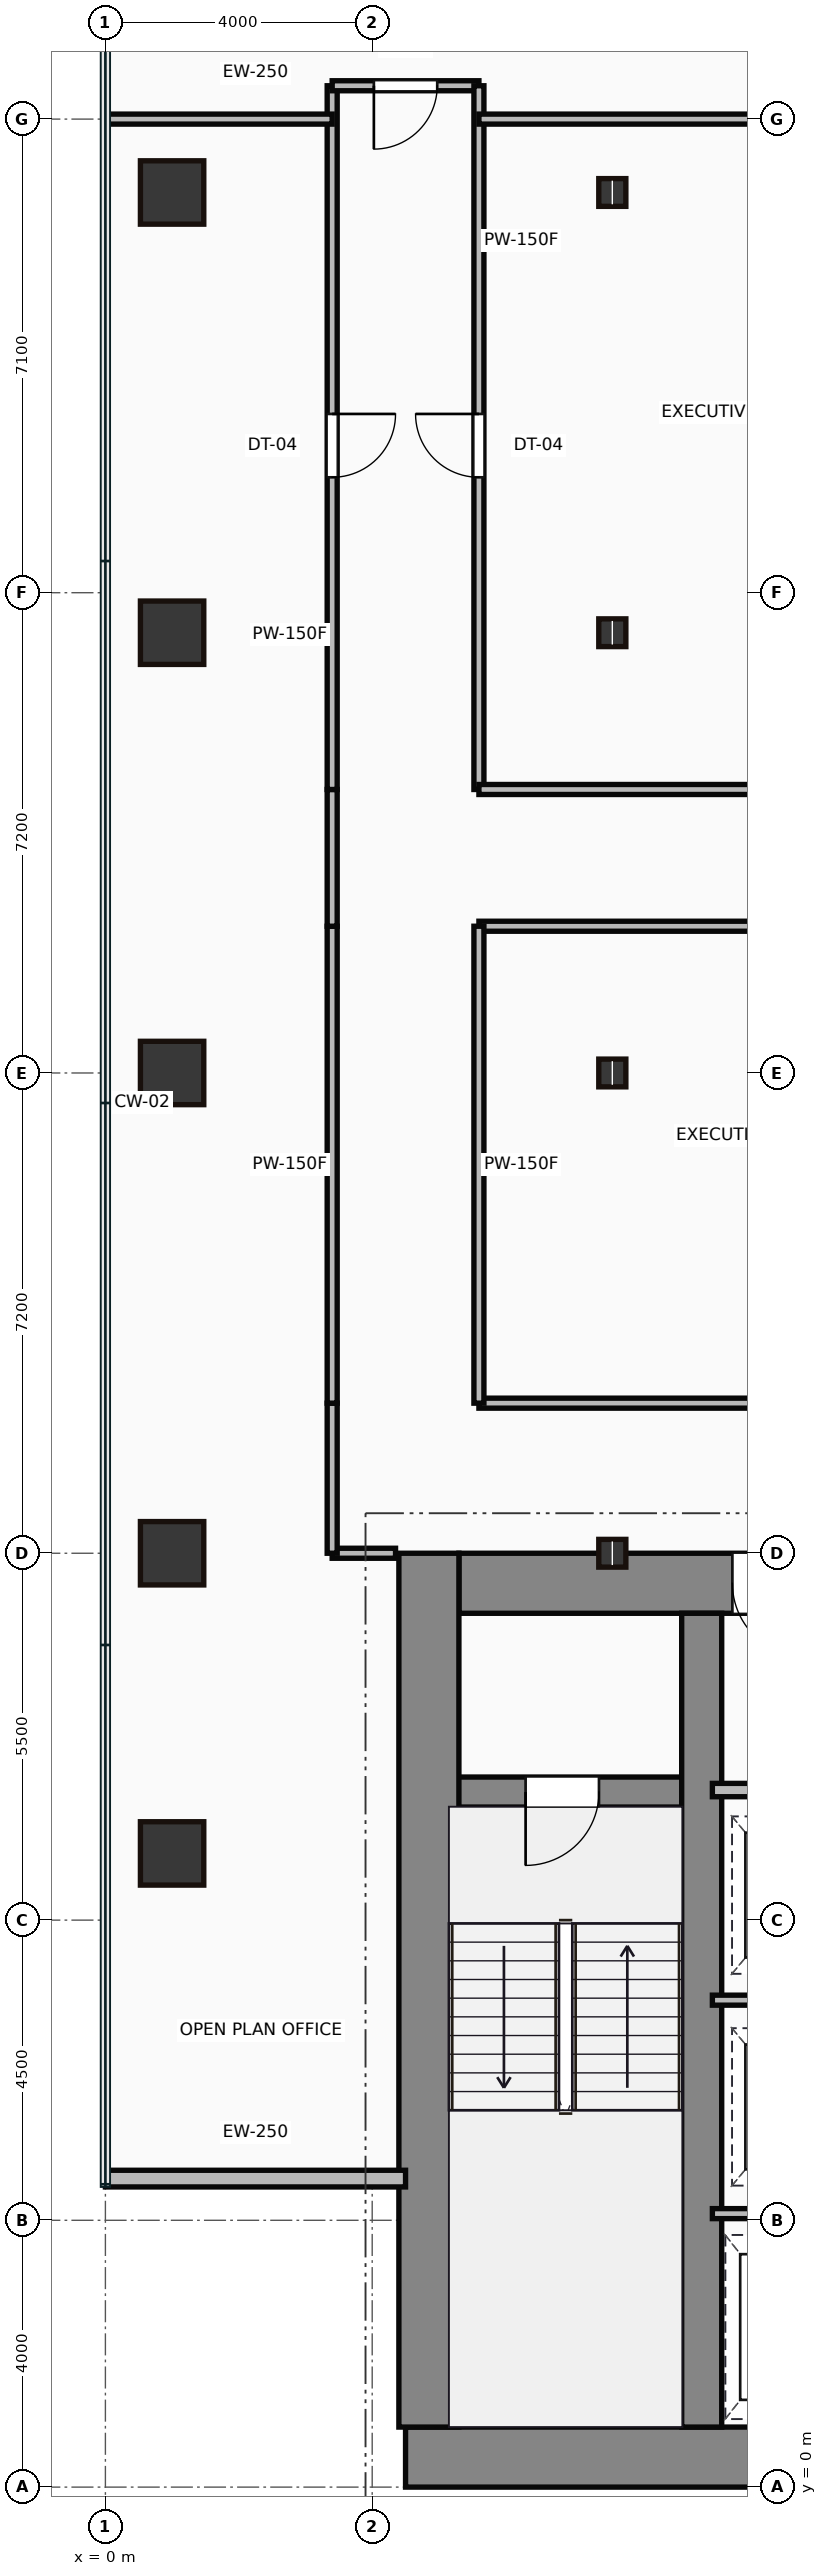
"""IFC4 building model, lengths in metres.
Left out: names, types, materials, properties, quantities, classifications, styles, units other than length and angle.
Written with IfcOpenShell. Run it as: python <this file> out.ifc"""

import sys

from ifc_helpers import new_model, si_unit, direction, frame, frame_2d, origin, origin_2d, place, context, subcontext, project, spatial, rectangle, hollow_rectangle, i_section, extrude, source, transform, mapped, element, fill, save


model = new_model("IFC4")
c1 = context("Model", 3, precision=1e-05, world=origin(), true_north=direction((0.0, 1.0)))
c2 = subcontext(c1, "Body", "Model", "MODEL_VIEW")
j1 = project(units=[si_unit("LENGTHUNIT", "METRE"), si_unit("PLANEANGLEUNIT", "RADIAN")], contexts=[c1])
p1 = place(None, origin())
s1 = spatial("IfcSite", under=j1, at=p1, CompositionType="ELEMENT")
p2 = place(p1, origin())
s2 = spatial("IfcBuilding", under=s1, at=p2, CompositionType="ELEMENT")
p3 = place(p2, frame((0.0, 0.0, 69.0)))
s3 = spatial("IfcBuildingStorey", under=s2, at=p3, CompositionType="ELEMENT", Elevation=69.0)
m1 = source(origin(), c2, "Body", "SweptSolid", [
    extrude(rectangle(XDim=29.5, YDim=0.9, at=frame_2d((14.75, 0.0))), origin(), (0.0, 0.0, 1.0), 3.65),
])
p4 = place(p3, frame((4.5, 0.45, 0.0), z_axis=(0.0, 0.0, 1.0), x_axis=(1.0, 0.0, 0.0)))
e1 = element("IfcWall", 1, at=p4, inside=s3, PredefinedType="SHEAR", context=c2, shape_type="MappedRepresentation", body=[
    mapped(m1, transform((0.0, 0.0, 0.0))),
])
m2 = source(origin(), c2, "Body", "SweptSolid", [
    extrude(rectangle(XDim=13.1, YDim=0.9, at=frame_2d((6.55, 0.0))), origin(), (0.0, 0.0, 1.0), 3.65),
])
p5 = place(p3, frame((4.85, 0.9, 0.0), z_axis=(0.0, 0.0, 1.0), x_axis=(0.0, 1.0, 0.0)))
e2 = element("IfcWall", 2, at=p5, inside=s3, PredefinedType="SHEAR", context=c2, shape_type="MappedRepresentation", body=[
    mapped(m2, transform((0.0, 0.0, 0.0))),
])
m3 = source(origin(), c2, "Body", "SweptSolid", [
    extrude(rectangle(XDim=9.1, YDim=0.9, at=frame_2d((4.55, 0.0))), origin(), (0.0, 0.0, 1.0), 3.65),
])
p6 = place(p3, frame((5.3, 13.55, 0.0), z_axis=(0.0, 0.0, 1.0), x_axis=(1.0, 0.0, 0.0)))
e3 = element("IfcWall", 3, at=p6, inside=s3, PredefinedType="SHEAR", context=c2, shape_type="MappedRepresentation", body=[
    mapped(m3, transform((0.0, 0.0, 0.0))),
])
p7 = place(p6, frame((4.1, 0.0, 0.0)))
e4 = element("IfcOpeningElement", 4, at=p7, cuts=e3, PredefinedType="OPENING", context=c2, shape_type="SweptSolid", body=[
    extrude(rectangle(XDim=1.1, YDim=2.15, at=frame_2d((0.55, 1.075))), frame((0.0, 0.46, 0.0), z_axis=(0.0, -1.0, 0.0), x_axis=(1.0, 0.0, 0.0)), (0.0, 0.0, 1.0), 0.92),
])
m4 = source(origin(), c2, "Body", "SweptSolid", [
    extrude(rectangle(XDim=12.2, YDim=0.6, at=frame_2d((6.1, 0.0))), origin(), (0.0, 0.0, 1.0), 3.65),
])
p8 = place(p3, frame((8.94, 0.9, 0.0), z_axis=(0.0, 0.0, 1.0), x_axis=(0.0, 1.0, 0.0)))
e5 = element("IfcWall", 5, at=p8, inside=s3, PredefinedType="SHEAR", context=c2, shape_type="MappedRepresentation", body=[
    mapped(m4, transform((0.0, 0.0, 0.0))),
])
m5 = source(origin(), c2, "Body", "SweptSolid", [
    extrude(rectangle(XDim=3.39, YDim=0.45, at=frame_2d((1.695, 0.0))), origin(), (0.0, 0.0, 1.0), 3.65),
])
p9 = place(p3, frame((5.25, 10.42, 0.0), z_axis=(0.0, 0.0, 1.0), x_axis=(1.0, 0.0, 0.0)))
e6 = element("IfcWall", 6, at=p9, inside=s3, PredefinedType="SHEAR", context=c2, shape_type="MappedRepresentation", body=[
    mapped(m5, transform((0.0, 0.0, 0.0))),
])
p10 = place(p9, frame((1.05, 0.0, 0.0)))
e7 = element("IfcOpeningElement", 7, at=p10, cuts=e6, PredefinedType="OPENING", context=c2, shape_type="SweptSolid", body=[
    extrude(rectangle(XDim=1.1, YDim=2.15, at=frame_2d((0.55, 1.075))), frame((0.0, 0.235, 0.0), z_axis=(0.0, -1.0, 0.0), x_axis=(1.0, 0.0, 0.0)), (0.0, 0.0, 1.0), 0.47),
])
m6 = source(origin(), c2, "Body", "SweptSolid", [
    extrude(hollow_rectangle(XDim=0.95, YDim=0.95, WallThickness=0.045, at=origin_2d()), origin(), (0.0, 0.0, 1.0), 3.65),
])
for number, where, z_axis, x_axis in (
    (8, (1.0, 9.5, 0.0), (0.0, 0.0, 1.0), (1.0, 0.0, 0.0)),
    (9, (1.0, 14.0, 0.0), (0.0, 0.0, 1.0), (1.0, 0.0, 0.0)),
    (10, (1.0, 21.2, 0.0), (0.0, 0.0, 1.0), (1.0, 0.0, 0.0)),
    (11, (1.0, 27.8, 0.0), (0.0, 0.0, 1.0), (1.0, 0.0, 0.0)),
    (12, (1.0, 34.4, 0.0), (0.0, 0.0, 1.0), (1.0, 0.0, 0.0)),
):
    element("IfcColumn", number, at=place(p3, frame(where, z_axis=z_axis, x_axis=x_axis)), inside=s3, PredefinedType="COLUMN", context=c2, shape_type="MappedRepresentation", body=[
        mapped(m6, transform((0.0, 0.0, 0.0))),
    ])
m7 = source(origin(), c2, "Body", "SweptSolid", [
    extrude(i_section(OverallWidth=0.406, OverallDepth=0.416, WebThickness=0.03, FlangeThickness=0.048, at=origin_2d()), origin(), (0.0, 0.0, 1.0), 3.65),
])
for number, where, z_axis, x_axis in (
    (13, (7.6, 14.0, 0.0), (0.0, 0.0, 1.0), (1.0, 0.0, 0.0)),
    (14, (7.6, 21.2, 0.0), (0.0, 0.0, 1.0), (1.0, 0.0, 0.0)),
    (15, (7.6, 27.8, 0.0), (0.0, 0.0, 1.0), (1.0, 0.0, 0.0)),
    (16, (7.6, 34.4, 0.0), (0.0, 0.0, 1.0), (1.0, 0.0, 0.0)),
):
    element("IfcColumn", number, at=place(p3, frame(where, z_axis=z_axis, x_axis=x_axis)), inside=s3, PredefinedType="COLUMN", context=c2, shape_type="MappedRepresentation", body=[
        mapped(m7, transform((0.0, 0.0, 0.0))),
    ])
m8 = source(origin(), c2, "Body", "SweptSolid", [
    extrude(rectangle(XDim=4.5, YDim=0.25, at=frame_2d((2.25, 0.0))), origin(), (0.0, 0.0, 1.0), 3.4),
])
p11 = place(p3, frame((0.0, 4.625, 0.0), z_axis=(0.0, 0.0, 1.0), x_axis=(1.0, 0.0, 0.0)))
e17 = element("IfcWall", 17, at=p11, inside=s3, PredefinedType="STANDARD", context=c2, shape_type="MappedRepresentation", body=[
    mapped(m8, transform((0.0, 0.0, 0.0))),
])
m9 = source(origin(), c2, "Body", "SweptSolid", [
    extrude(rectangle(XDim=2.35, YDim=0.2, at=frame_2d((1.175, 0.0))), origin(), (0.0, 0.0, 1.0), 3.4),
])
p12 = place(p3, frame((9.1, 10.45, 0.0), z_axis=(0.0, 0.0, 1.0), x_axis=(1.0, 0.0, 0.0)))
e18 = element("IfcWall", 18, at=p12, inside=s3, PredefinedType="PARTITIONING", context=c2, shape_type="MappedRepresentation", body=[
    mapped(m9, transform((0.0, 0.0, 0.0))),
])
p13 = place(p12, frame((0.55, 0.0, 0.0)))
e19 = element("IfcOpeningElement", 19, at=p13, cuts=e18, PredefinedType="OPENING", context=c2, shape_type="SweptSolid", body=[
    extrude(rectangle(XDim=1.1, YDim=2.15, at=frame_2d((0.55, 1.075))), frame((0.0, 0.11, 0.0), z_axis=(0.0, -1.0, 0.0), x_axis=(1.0, 0.0, 0.0)), (0.0, 0.0, 1.0), 0.22),
])
m10 = source(origin(), c2, "Body", "SweptSolid", [
    extrude(rectangle(XDim=2.4, YDim=0.15, at=frame_2d((1.2, 0.0))), origin(), (0.0, 0.0, 1.0), 3.4),
])
for number, where, z_axis, x_axis in (
    (20, (9.1, 4.1, 0.0), (0.0, 0.0, 1.0), (1.0, 0.0, 0.0)),
    (21, (9.1, 7.3, 0.0), (0.0, 0.0, 1.0), (1.0, 0.0, 0.0)),
):
    element("IfcWall", number, at=place(p3, frame(where, z_axis=z_axis, x_axis=x_axis)), inside=s3, PredefinedType="PARTITIONING", context=c2, shape_type="MappedRepresentation", body=[
        mapped(m10, transform((0.0, 0.0, 0.0))),
    ])
m11 = source(origin(), c2, "Body", "SweptSolid", [
    extrude(rectangle(XDim=0.95, YDim=0.15, at=frame_2d((0.475, 0.0))), origin(), (0.0, 0.0, 1.0), 2.625),
])
p14 = place(p3, frame((4.35, 14.0, 0.0), z_axis=(0.0, 0.0, 1.0), x_axis=(-1.0, 0.0, 0.0)))
e22 = element("IfcWall", 22, at=p14, inside=s3, PredefinedType="PARTITIONING", context=c2, shape_type="MappedRepresentation", body=[
    mapped(m11, transform((0.0, 0.0, 0.0))),
])
m12 = source(origin(), c2, "Body", "SweptSolid", [
    extrude(rectangle(XDim=2.25, YDim=0.15, at=frame_2d((1.125, 0.0))), origin(), (0.0, 0.0, 1.0), 3.4),
])
p15 = place(p3, frame((3.4, 14.0, 0.0), z_axis=(0.0, 0.0, 1.0), x_axis=(0.0, 1.0, 0.0)))
e23 = element("IfcWall", 23, at=p15, inside=s3, PredefinedType="PARTITIONING", context=c2, shape_type="MappedRepresentation", body=[
    mapped(m12, transform((0.0, 0.0, 0.0))),
])
m13 = source(origin(), c2, "Body", "SweptSolid", [
    extrude(rectangle(XDim=7.15, YDim=0.15, at=frame_2d((3.575, 0.0))), origin(), (0.0, 0.0, 1.0), 3.4),
])
p16 = place(p3, frame((3.4, 16.25, 0.0), z_axis=(0.0, 0.0, 1.0), x_axis=(0.0, 1.0, 0.0)))
e24 = element("IfcWall", 24, at=p16, inside=s3, PredefinedType="PARTITIONING", context=c2, shape_type="MappedRepresentation", body=[
    mapped(m13, transform((0.0, 0.0, 0.0))),
])
m14 = source(origin(), c2, "Body", "SweptSolid", [
    extrude(rectangle(XDim=2.05, YDim=0.15, at=frame_2d((1.025, 0.0))), origin(), (0.0, 0.0, 1.0), 3.4),
])
p17 = place(p3, frame((3.4, 23.4, 0.0), z_axis=(0.0, 0.0, 1.0), x_axis=(0.0, 1.0, 0.0)))
e25 = element("IfcWall", 25, at=p17, inside=s3, PredefinedType="PARTITIONING", context=c2, shape_type="MappedRepresentation", body=[
    mapped(m14, transform((0.0, 0.0, 0.0))),
])
m15 = source(origin(), c2, "Body", "SweptSolid", [
    extrude(rectangle(XDim=10.55, YDim=0.15, at=frame_2d((5.275, 0.0))), origin(), (0.0, 0.0, 1.0), 3.4),
])
p18 = place(p3, frame((3.4, 25.45, 0.0), z_axis=(0.0, 0.0, 1.0), x_axis=(0.0, 1.0, 0.0)))
e26 = element("IfcWall", 26, at=p18, inside=s3, PredefinedType="PARTITIONING", context=c2, shape_type="MappedRepresentation", body=[
    mapped(m15, transform((0.0, 0.0, 0.0))),
])
p19 = place(p18, frame((4.68, 0.0, 0.0)))
e27 = element("IfcOpeningElement", 27, at=p19, cuts=e26, PredefinedType="OPENING", context=c2, shape_type="SweptSolid", body=[
    extrude(rectangle(XDim=0.95, YDim=2.15, at=frame_2d((0.475, 1.075))), frame((0.0, 0.085, 0.0), z_axis=(0.0, -1.0, 0.0), x_axis=(1.0, 0.0, 0.0)), (0.0, 0.0, 1.0), 0.17),
])
m16 = source(origin(), c2, "Body", "SweptSolid", [
    extrude(rectangle(XDim=2.2, YDim=0.15, at=frame_2d((1.1, 0.0))), origin(), (0.0, 0.0, 1.0), 3.4),
])
p20 = place(p3, frame((3.4, 36.0, 0.0), z_axis=(0.0, 0.0, 1.0), x_axis=(1.0, 0.0, 0.0)))
e28 = element("IfcWall", 28, at=p20, inside=s3, PredefinedType="PARTITIONING", context=c2, shape_type="MappedRepresentation", body=[
    mapped(m16, transform((0.0, 0.0, 0.0))),
])
p21 = place(p20, frame((0.625, 0.0, 0.0)))
e29 = element("IfcOpeningElement", 29, at=p21, cuts=e28, PredefinedType="OPENING", context=c2, shape_type="SweptSolid", body=[
    extrude(rectangle(XDim=0.95, YDim=2.15, at=frame_2d((0.475, 1.075))), frame((0.0, 0.085, 0.0), z_axis=(0.0, -1.0, 0.0), x_axis=(1.0, 0.0, 0.0)), (0.0, 0.0, 1.0), 0.17),
])
p22 = place(p3, frame((5.6, 36.0, 0.0), z_axis=(0.0, 0.0, 1.0), x_axis=(0.0, -1.0, 0.0)))
e30 = element("IfcWall", 30, at=p22, inside=s3, PredefinedType="PARTITIONING", context=c2, shape_type="MappedRepresentation", body=[
    mapped(m15, transform((0.0, 0.0, 0.0))),
])
p23 = place(p22, frame((4.92, 0.0, 0.0)))
e31 = element("IfcOpeningElement", 31, at=p23, cuts=e30, PredefinedType="OPENING", context=c2, shape_type="SweptSolid", body=[
    extrude(rectangle(XDim=0.95, YDim=2.15, at=frame_2d((0.475, 1.075))), frame((0.0, 0.085, 0.0), z_axis=(0.0, -1.0, 0.0), x_axis=(1.0, 0.0, 0.0)), (0.0, 0.0, 1.0), 0.17),
])
m17 = source(origin(), c2, "Body", "SweptSolid", [
    extrude(rectangle(XDim=38.8, YDim=0.15, at=frame_2d((19.4, 0.0))), origin(), (0.0, 0.0, 1.0), 3.4),
])
p24 = place(p3, frame((5.6, 25.45, 0.0), z_axis=(0.0, 0.0, 1.0), x_axis=(1.0, 0.0, 0.0)))
e32 = element("IfcWall", 32, at=p24, inside=s3, PredefinedType="PARTITIONING", context=c2, shape_type="MappedRepresentation", body=[
    mapped(m17, transform((0.0, 0.0, 0.0))),
])
p25 = place(p24, frame((14.125, 0.0, 0.0)))
e33 = element("IfcOpeningElement", 33, at=p25, cuts=e32, PredefinedType="OPENING", context=c2, shape_type="SweptSolid", body=[
    extrude(rectangle(XDim=0.95, YDim=2.15, at=frame_2d((0.475, 1.075))), frame((0.0, 0.085, 0.0), z_axis=(0.0, -1.0, 0.0), x_axis=(1.0, 0.0, 0.0)), (0.0, 0.0, 1.0), 0.17),
])
p26 = place(p24, frame((24.925, 0.0, 0.0)))
e34 = element("IfcOpeningElement", 34, at=p26, cuts=e32, PredefinedType="OPENING", context=c2, shape_type="SweptSolid", body=[
    extrude(rectangle(XDim=0.95, YDim=2.15, at=frame_2d((0.475, 1.075))), frame((0.0, 0.085, 0.0), z_axis=(0.0, -1.0, 0.0), x_axis=(1.0, 0.0, 0.0)), (0.0, 0.0, 1.0), 0.17),
])
p27 = place(p3, frame((5.6, 16.25, 0.0), z_axis=(0.0, 0.0, 1.0), x_axis=(1.0, 0.0, 0.0)))
e35 = element("IfcWall", 35, at=p27, inside=s3, PredefinedType="PARTITIONING", context=c2, shape_type="MappedRepresentation", body=[
    mapped(m17, transform((0.0, 0.0, 0.0))),
])
p28 = place(p27, frame((4.255, 0.0, 0.0)))
e36 = element("IfcOpeningElement", 36, at=p28, cuts=e35, PredefinedType="OPENING", context=c2, shape_type="SweptSolid", body=[
    extrude(rectangle(XDim=0.95, YDim=2.15, at=frame_2d((0.475, 1.075))), frame((0.0, 0.085, 0.0), z_axis=(0.0, -1.0, 0.0), x_axis=(1.0, 0.0, 0.0)), (0.0, 0.0, 1.0), 0.17),
])
p29 = place(p27, frame((14.125, 0.0, 0.0)))
e37 = element("IfcOpeningElement", 37, at=p29, cuts=e35, PredefinedType="OPENING", context=c2, shape_type="SweptSolid", body=[
    extrude(rectangle(XDim=0.95, YDim=2.15, at=frame_2d((0.475, 1.075))), frame((0.0, 0.085, 0.0), z_axis=(0.0, -1.0, 0.0), x_axis=(1.0, 0.0, 0.0)), (0.0, 0.0, 1.0), 0.17),
])
m18 = source(origin(), c2, "Body", "SweptSolid", [
    extrude(rectangle(XDim=38.8, YDim=0.15, at=frame_2d((19.4, 0.0))), origin(), (0.0, 0.0, 1.0), 2.978),
])
p30 = place(p3, frame((44.4, 23.4, 0.0), z_axis=(0.0, 0.0, 1.0), x_axis=(-1.0, 0.0, 0.0)))
e38 = element("IfcWall", 38, at=p30, inside=s3, PredefinedType="PARTITIONING", context=c2, shape_type="MappedRepresentation", body=[
    mapped(m18, transform((0.0, 0.0, 0.0))),
])
p31 = place(p30, frame((12.925, 0.0, 0.0)))
e39 = element("IfcOpeningElement", 39, at=p31, cuts=e38, PredefinedType="OPENING", context=c2, shape_type="SweptSolid", body=[
    extrude(rectangle(XDim=0.95, YDim=2.15, at=frame_2d((0.475, 1.075))), frame((0.0, 0.085, 0.0), z_axis=(0.0, -1.0, 0.0), x_axis=(1.0, 0.0, 0.0)), (0.0, 0.0, 1.0), 0.17),
])
p32 = place(p30, frame((3.655, 0.0, 0.0)))
e40 = element("IfcOpeningElement", 40, at=p32, cuts=e38, PredefinedType="OPENING", context=c2, shape_type="SweptSolid", body=[
    extrude(rectangle(XDim=0.95, YDim=2.15, at=frame_2d((0.475, 1.075))), frame((0.0, 0.085, 0.0), z_axis=(0.0, -1.0, 0.0), x_axis=(1.0, 0.0, 0.0)), (0.0, 0.0, 1.0), 0.17),
])
p33 = place(p3, frame((5.6, 23.4, 0.0), z_axis=(0.0, 0.0, 1.0), x_axis=(0.0, -1.0, 0.0)))
e41 = element("IfcWall", 41, at=p33, inside=s3, PredefinedType="PARTITIONING", context=c2, shape_type="MappedRepresentation", body=[
    mapped(m13, transform((0.0, 0.0, 0.0))),
])
m19 = source(origin(), c2, "Body", "SweptSolid", [
    extrude(rectangle(XDim=3.38, YDim=0.15, at=frame_2d((1.69, 0.0))), origin(), (0.0, 0.0, 1.0), 3.4),
])
p34 = place(p3, frame((0.02, 35.5, 0.0), z_axis=(0.0, 0.0, 1.0), x_axis=(1.0, 0.0, 0.0)))
e42 = element("IfcWall", 42, at=p34, inside=s3, PredefinedType="PARTITIONING", context=c2, shape_type="MappedRepresentation", body=[
    mapped(m19, transform((0.0, 0.0, 0.0))),
])
m20 = source(origin(), c2, "Body", "SweptSolid", [
    extrude(rectangle(XDim=9.2, YDim=0.15, at=frame_2d((4.6, 0.0))), origin(), (0.0, 0.0, 1.0), 3.4),
])
p35 = place(p3, frame((14.8, 35.5, 0.0), z_axis=(0.0, 0.0, 1.0), x_axis=(-1.0, 0.0, 0.0)))
e43 = element("IfcWall", 43, at=p35, inside=s3, PredefinedType="PARTITIONING", context=c2, shape_type="MappedRepresentation", body=[
    mapped(m20, transform((0.0, 0.0, 0.0))),
])
m21 = source(origin(), c2, "Body", "SweptSolid", [
    extrude(rectangle(XDim=1.1, YDim=2.15, at=frame_2d((0.55, 1.075))), frame((0.0, 0.025, 0.0), z_axis=(0.0, -1.0, 0.0), x_axis=(1.0, 0.0, 0.0)), (0.0, 0.0, 1.0), 0.05),
])
p36 = place(p10, frame((1.1, 0.0, 0.0), z_axis=(0.0, 0.0, 1.0), x_axis=(-1.0, 0.0, 0.0)))
e44 = element("IfcDoor", 44, at=p36, inside=s3, OperationType="SINGLE_SWING_LEFT", PredefinedType="DOOR", context=c2, shape_type="MappedRepresentation", body=[
    mapped(m21, transform((0.0, 0.0, 0.0))),
])
fill(e7, e44)
p37 = place(p7, origin())
e45 = element("IfcDoor", 45, at=p37, inside=s3, OperationType="SINGLE_SWING_RIGHT", PredefinedType="DOOR", context=c2, shape_type="MappedRepresentation", body=[
    mapped(m21, transform((0.0, 0.0, 0.0))),
])
fill(e4, e45)
m22 = source(origin(), c2, "Body", "SweptSolid", [
    extrude(rectangle(XDim=0.95, YDim=2.15, at=frame_2d((0.475, 1.075))), frame((0.0, 0.025, 0.0), z_axis=(0.0, -1.0, 0.0), x_axis=(1.0, 0.0, 0.0)), (0.0, 0.0, 1.0), 0.05),
])
p38 = place(p19, origin())
e46 = element("IfcDoor", 46, at=p38, inside=s3, OperationType="SINGLE_SWING_RIGHT", PredefinedType="DOOR", context=c2, shape_type="MappedRepresentation", body=[
    mapped(m22, transform((0.0, 0.0, 0.0))),
])
fill(e27, e46)
p39 = place(p21, origin())
e47 = element("IfcDoor", 47, at=p39, inside=s3, OperationType="SINGLE_SWING_LEFT", PredefinedType="DOOR", context=c2, shape_type="MappedRepresentation", body=[
    mapped(m22, transform((0.0, 0.0, 0.0))),
])
fill(e29, e47)
p40 = place(p23, origin())
e48 = element("IfcDoor", 48, at=p40, inside=s3, OperationType="SINGLE_SWING_LEFT", PredefinedType="DOOR", context=c2, shape_type="MappedRepresentation", body=[
    mapped(m22, transform((0.0, 0.0, 0.0))),
])
fill(e31, e48)
save(model, sys.argv[1])
